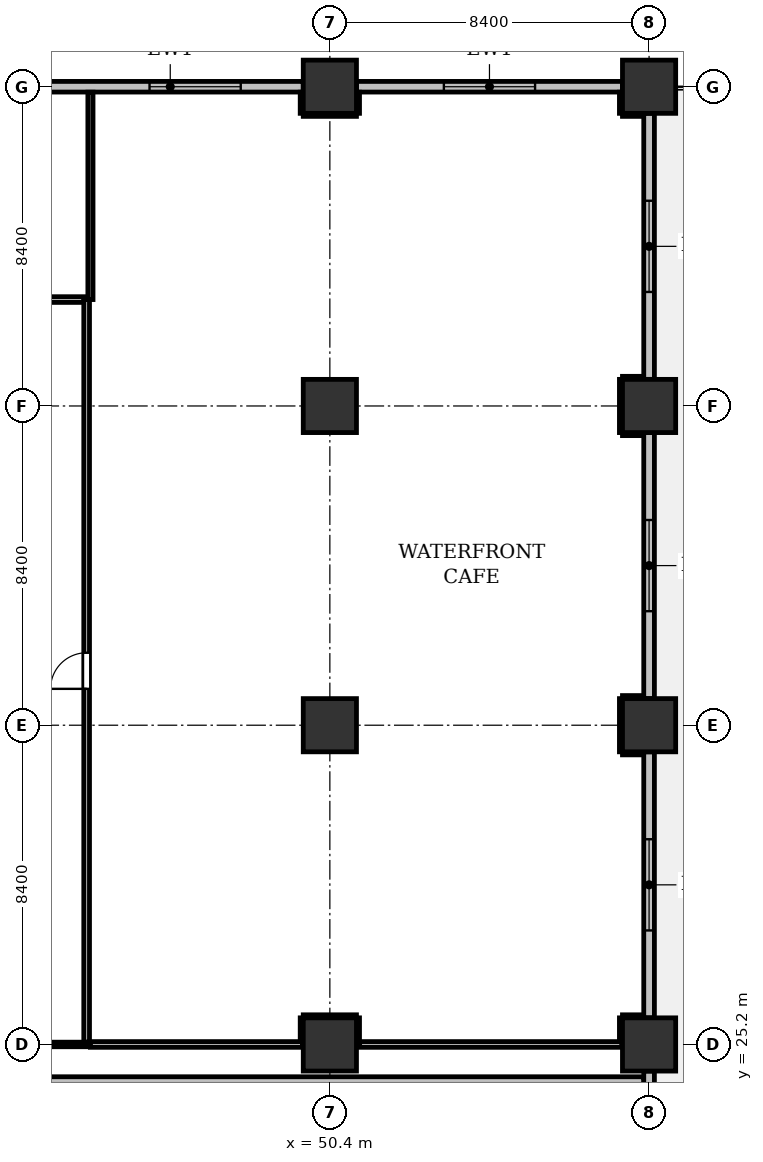
"""IFC4 building model, lengths in metres.
Left out: names, types, materials, properties, quantities, classifications, styles, units other than length and angle.
Written with IfcOpenShell. Run it as: python <this file> out.ifc"""

import sys

from ifc_helpers import new_model, si_unit, direction, frame, frame_2d, origin, origin_2d, place, context, subcontext, project, spatial, rectangle, extrude, element, fill, save


model = new_model("IFC4")
c1 = context("Model", 3, precision=1e-05, world=origin(), true_north=direction((0.0, 1.0)))
c2 = subcontext(c1, "Body", "Model", "MODEL_VIEW")
j1 = project(units=[si_unit("LENGTHUNIT", "METRE"), si_unit("PLANEANGLEUNIT", "RADIAN")], contexts=[c1])
p1 = place(None, origin())
s1 = spatial("IfcSite", under=j1, at=p1, CompositionType="ELEMENT")
p2 = place(p1, origin())
s2 = spatial("IfcBuilding", under=s1, at=p2, CompositionType="ELEMENT")
p3 = place(p2, origin())
s3 = spatial("IfcBuildingStorey", under=s2, at=p3, CompositionType="ELEMENT", Elevation=0.0)
for number, where, z_axis, x_axis in (
    (1, (50.4, 25.2, 0.0), (0.0, 0.0, 1.0), (1.0, 0.0, 0.0)),
    (2, (50.4, 33.6, 0.0), (0.0, 0.0, 1.0), (1.0, 0.0, 0.0)),
    (3, (50.4, 42.0, 0.0), (0.0, 0.0, 1.0), (1.0, 0.0, 0.0)),
    (4, (50.4, 50.4, 0.0), (0.0, 0.0, 1.0), (1.0, 0.0, 0.0)),
    (5, (58.8, 25.2, 0.0), (0.0, 0.0, 1.0), (1.0, 0.0, 0.0)),
    (6, (58.8, 33.6, 0.0), (0.0, 0.0, 1.0), (1.0, 0.0, 0.0)),
    (7, (58.8, 42.0, 0.0), (0.0, 0.0, 1.0), (1.0, 0.0, 0.0)),
    (8, (58.8, 50.4, 0.0), (0.0, 0.0, 1.0), (1.0, 0.0, 0.0)),
):
    element("IfcColumn", number, at=place(p3, frame(where, z_axis=z_axis, x_axis=x_axis)), inside=s3, PredefinedType="COLUMN", context=c2, shape_type="SweptSolid", body=[
        extrude(rectangle(XDim=1.4, YDim=1.4, at=origin_2d()), origin(), (0.0, 0.0, 1.0), 5.4),
    ])
p4 = place(p3, frame((42.7, 50.4, 0.0), z_axis=(0.0, 0.0, 1.0), x_axis=(1.0, 0.0, 0.0)))
e9 = element("IfcWall", 9, at=p4, inside=s3, PredefinedType="STANDARD", context=c2, shape_type="SweptSolid", body=[
    extrude(rectangle(XDim=7.0, YDim=0.28, at=frame_2d((3.5, 0.0))), origin(), (0.0, 0.0, 1.0), 4.325),
])
p5 = place(p4, frame((2.955, 0.0, 0.9)))
e10 = element("IfcOpeningElement", 10, at=p5, cuts=e9, PredefinedType="OPENING", context=c2, shape_type="SweptSolid", body=[
    extrude(rectangle(XDim=2.4, YDim=1.8, at=frame_2d((1.2, 0.9))), frame((0.0, 0.15, 0.0), z_axis=(0.0, -1.0, 0.0), x_axis=(1.0, 0.0, 0.0)), (0.0, 0.0, 1.0), 0.3),
])
p6 = place(p3, frame((51.1, 50.4, 0.0), z_axis=(0.0, 0.0, 1.0), x_axis=(1.0, 0.0, 0.0)))
e11 = element("IfcWall", 11, at=p6, inside=s3, PredefinedType="STANDARD", context=c2, shape_type="SweptSolid", body=[
    extrude(rectangle(XDim=7.0, YDim=0.28, at=frame_2d((3.5, 0.0))), origin(), (0.0, 0.0, 1.0), 4.325),
])
p7 = place(p6, frame((2.3, 0.0, 0.9)))
e12 = element("IfcOpeningElement", 12, at=p7, cuts=e11, PredefinedType="OPENING", context=c2, shape_type="SweptSolid", body=[
    extrude(rectangle(XDim=2.4, YDim=1.8, at=frame_2d((1.2, 0.9))), frame((0.0, 0.15, 0.0), z_axis=(0.0, -1.0, 0.0), x_axis=(1.0, 0.0, 0.0)), (0.0, 0.0, 1.0), 0.3),
])
p8 = place(p3, frame((58.8, 49.7, 0.0), z_axis=(0.0, 0.0, 1.0), x_axis=(0.0, -1.0, 0.0)))
e13 = element("IfcWall", 13, at=p8, inside=s3, PredefinedType="STANDARD", context=c2, shape_type="SweptSolid", body=[
    extrude(rectangle(XDim=7.0, YDim=0.28, at=frame_2d((3.5, 0.0))), origin(), (0.0, 0.0, 1.0), 4.513),
])
p9 = place(p8, frame((2.3, 0.0, 0.9)))
e14 = element("IfcOpeningElement", 14, at=p9, cuts=e13, PredefinedType="OPENING", context=c2, shape_type="SweptSolid", body=[
    extrude(rectangle(XDim=2.4, YDim=1.8, at=frame_2d((1.2, 0.9))), frame((0.0, 0.15, 0.0), z_axis=(0.0, -1.0, 0.0), x_axis=(1.0, 0.0, 0.0)), (0.0, 0.0, 1.0), 0.3),
])
p10 = place(p3, frame((58.8, 41.3, 0.0), z_axis=(0.0, 0.0, 1.0), x_axis=(0.0, -1.0, 0.0)))
e15 = element("IfcWall", 15, at=p10, inside=s3, PredefinedType="STANDARD", context=c2, shape_type="SweptSolid", body=[
    extrude(rectangle(XDim=7.0, YDim=0.28, at=frame_2d((3.5, 0.0))), origin(), (0.0, 0.0, 1.0), 4.513),
])
p11 = place(p10, frame((2.3, 0.0, 0.9)))
e16 = element("IfcOpeningElement", 16, at=p11, cuts=e15, PredefinedType="OPENING", context=c2, shape_type="SweptSolid", body=[
    extrude(rectangle(XDim=2.4, YDim=1.8, at=frame_2d((1.2, 0.9))), frame((0.0, 0.15, 0.0), z_axis=(0.0, -1.0, 0.0), x_axis=(1.0, 0.0, 0.0)), (0.0, 0.0, 1.0), 0.3),
])
p12 = place(p3, frame((58.8, 32.9, 0.0), z_axis=(0.0, 0.0, 1.0), x_axis=(0.0, -1.0, 0.0)))
e17 = element("IfcWall", 17, at=p12, inside=s3, PredefinedType="STANDARD", context=c2, shape_type="SweptSolid", body=[
    extrude(rectangle(XDim=7.0, YDim=0.28, at=frame_2d((3.5, 0.0))), origin(), (0.0, 0.0, 1.0), 4.513),
])
p13 = place(p12, frame((2.3, 0.0, 0.9)))
e18 = element("IfcOpeningElement", 18, at=p13, cuts=e17, PredefinedType="OPENING", context=c2, shape_type="SweptSolid", body=[
    extrude(rectangle(XDim=2.4, YDim=1.8, at=frame_2d((1.2, 0.9))), frame((0.0, 0.15, 0.0), z_axis=(0.0, -1.0, 0.0), x_axis=(1.0, 0.0, 0.0)), (0.0, 0.0, 1.0), 0.3),
])
p14 = place(p3, frame((58.8, 24.5, 0.0), z_axis=(0.0, 0.0, 1.0), x_axis=(0.0, -1.0, 0.0)))
e19 = element("IfcWall", 19, at=p14, inside=s3, PredefinedType="STANDARD", context=c2, shape_type="SweptSolid", body=[
    extrude(rectangle(XDim=7.0, YDim=0.28, at=frame_2d((3.5, 0.0))), origin(), (0.0, 0.0, 1.0), 4.513),
])
p15 = place(p14, frame((0.38, 0.0, 0.0)))
e20 = element("IfcOpeningElement", 20, at=p15, cuts=e19, PredefinedType="OPENING", context=c2, shape_type="SweptSolid", body=[
    extrude(rectangle(XDim=2.0, YDim=2.4, at=frame_2d((1.0, 1.2))), frame((0.0, 0.15, 0.0), z_axis=(0.0, -1.0, 0.0), x_axis=(1.0, 0.0, 0.0)), (0.0, 0.0, 1.0), 0.3),
])
p16 = place(p3, frame((58.656, 24.25, 0.0), z_axis=(0.0, 0.0, 1.0), x_axis=(-1.0, 0.0, 0.0)))
e21 = element("IfcWall", 21, at=p16, inside=s3, PredefinedType="PARTITIONING", context=c2, shape_type="SweptSolid", body=[
    extrude(rectangle(XDim=24.906, YDim=0.2, at=frame_2d((12.453, 0.0))), origin(), (0.0, 0.0, 1.0), 4.513),
])
p17 = place(p3, frame((42.784, 25.2, 0.0), z_axis=(0.0, 0.0, 1.0), x_axis=(1.0, 0.0, 0.0)))
e22 = element("IfcWall", 22, at=p17, inside=s3, PredefinedType="PARTITIONING", context=c2, shape_type="SweptSolid", body=[
    extrude(rectangle(XDim=1.216, YDim=0.12, at=frame_2d((0.608, 0.0))), origin(), (0.0, 0.0, 1.0), 4.325),
])
p18 = place(p3, frame((44.0, 25.264, 0.0), z_axis=(0.0, 0.0, 1.0), x_axis=(0.0, 1.0, 0.0)))
e23 = element("IfcWall", 23, at=p18, inside=s3, PredefinedType="PARTITIONING", context=c2, shape_type="SweptSolid", body=[
    extrude(rectangle(XDim=19.536, YDim=0.15, at=frame_2d((9.768, 0.0))), origin(), (0.0, 0.0, 1.0), 4.325),
])
p19 = place(p18, frame((9.293, 0.0, 0.0)))
e24 = element("IfcOpeningElement", 24, at=p19, cuts=e23, PredefinedType="OPENING", context=c2, shape_type="SweptSolid", body=[
    extrude(rectangle(XDim=0.95, YDim=2.15, at=frame_2d((0.475, 1.075))), frame((0.0, 0.085, 0.0), z_axis=(0.0, -1.0, 0.0), x_axis=(1.0, 0.0, 0.0)), (0.0, 0.0, 1.0), 0.17),
])
p20 = place(p3, frame((43.921, 44.8, 0.0), z_axis=(0.0, 0.0, 1.0), x_axis=(-1.0, 0.0, 0.0)))
e25 = element("IfcWall", 25, at=p20, inside=s3, PredefinedType="PARTITIONING", context=c2, shape_type="SweptSolid", body=[
    extrude(rectangle(XDim=19.261, YDim=0.15, at=frame_2d((9.63, 0.0))), origin(), (0.0, 0.0, 1.0), 4.513),
])
p21 = place(p3, frame((44.1, 25.2, 0.0), z_axis=(0.0, 0.0, 1.0), x_axis=(1.0, 0.0, 0.0)))
e26 = element("IfcWall", 26, at=p21, inside=s3, PredefinedType="PARTITIONING", context=c2, shape_type="SweptSolid", body=[
    extrude(rectangle(XDim=5.58, YDim=0.15, at=frame_2d((2.79, 0.0))), origin(), (0.0, 0.0, 1.0), 4.325),
])
p22 = place(p3, frame((49.68, 25.279, 0.0), z_axis=(0.0, 0.0, 1.0), x_axis=(0.0, 1.0, 0.0)))
e27 = element("IfcWall", 27, at=p22, inside=s3, PredefinedType="PARTITIONING", context=c2, shape_type="SweptSolid", body=[
    extrude(rectangle(XDim=0.621, YDim=0.12, at=frame_2d((0.311, 0.0))), origin(), (0.0, 0.0, 1.0), 4.325),
])
p23 = place(p3, frame((49.7, 25.92, 0.0), z_axis=(0.0, 0.0, 1.0), x_axis=(1.0, 0.0, 0.0)))
e28 = element("IfcWall", 28, at=p23, inside=s3, PredefinedType="PARTITIONING", context=c2, shape_type="SweptSolid", body=[
    extrude(rectangle(XDim=1.4, YDim=0.12, at=frame_2d((0.7, 0.0))), origin(), (0.0, 0.0, 1.0), 4.513),
])
p24 = place(p3, frame((51.12, 25.9, 0.0), z_axis=(0.0, 0.0, 1.0), x_axis=(0.0, -1.0, 0.0)))
e29 = element("IfcWall", 29, at=p24, inside=s3, PredefinedType="PARTITIONING", context=c2, shape_type="SweptSolid", body=[
    extrude(rectangle(XDim=0.7, YDim=0.12, at=frame_2d((0.35, 0.0))), origin(), (0.0, 0.0, 1.0), 4.325),
])
p25 = place(p3, frame((51.184, 25.2, 0.0), z_axis=(0.0, 0.0, 1.0), x_axis=(1.0, 0.0, 0.0)))
e30 = element("IfcWall", 30, at=p25, inside=s3, PredefinedType="PARTITIONING", context=c2, shape_type="SweptSolid", body=[
    extrude(rectangle(XDim=6.896, YDim=0.15, at=frame_2d((3.448, 0.0))), origin(), (0.0, 0.0, 1.0), 4.325),
])
p26 = place(p3, frame((58.08, 25.279, 0.0), z_axis=(0.0, 0.0, 1.0), x_axis=(0.0, 1.0, 0.0)))
e31 = element("IfcWall", 31, at=p26, inside=s3, PredefinedType="PARTITIONING", context=c2, shape_type="SweptSolid", body=[
    extrude(rectangle(XDim=0.621, YDim=0.12, at=frame_2d((0.311, 0.0))), origin(), (0.0, 0.0, 1.0), 4.325),
])
for number, where, z_axis, x_axis in (
    (32, (58.1, 25.92, 0.0), (0.0, 0.0, 1.0), (1.0, 0.0, 0.0)),
    (33, (58.656, 32.88, 0.0), (0.0, 0.0, 1.0), (-1.0, 0.0, 0.0)),
):
    element("IfcWall", number, at=place(p3, frame(where, z_axis=z_axis, x_axis=x_axis)), inside=s3, PredefinedType="PARTITIONING", context=c2, shape_type="SweptSolid", body=[
        extrude(rectangle(XDim=0.556, YDim=0.12, at=frame_2d((0.278, 0.0))), origin(), (0.0, 0.0, 1.0), 5.125),
    ])
p27 = place(p3, frame((58.08, 32.9, 0.0), z_axis=(0.0, 0.0, 1.0), x_axis=(0.0, 1.0, 0.0)))
e34 = element("IfcWall", 34, at=p27, inside=s3, PredefinedType="PARTITIONING", context=c2, shape_type="SweptSolid", body=[
    extrude(rectangle(XDim=1.4, YDim=0.12, at=frame_2d((0.7, 0.0))), origin(), (0.0, 0.0, 1.0), 4.325),
])
for number, where, z_axis, x_axis in (
    (35, (58.1, 34.32, 0.0), (0.0, 0.0, 1.0), (1.0, 0.0, 0.0)),
    (36, (58.656, 41.28, 0.0), (0.0, 0.0, 1.0), (-1.0, 0.0, 0.0)),
):
    element("IfcWall", number, at=place(p3, frame(where, z_axis=z_axis, x_axis=x_axis)), inside=s3, PredefinedType="PARTITIONING", context=c2, shape_type="SweptSolid", body=[
        extrude(rectangle(XDim=0.556, YDim=0.12, at=frame_2d((0.278, 0.0))), origin(), (0.0, 0.0, 1.0), 5.125),
    ])
p28 = place(p3, frame((58.08, 41.3, 0.0), z_axis=(0.0, 0.0, 1.0), x_axis=(0.0, 1.0, 0.0)))
e37 = element("IfcWall", 37, at=p28, inside=s3, PredefinedType="PARTITIONING", context=c2, shape_type="SweptSolid", body=[
    extrude(rectangle(XDim=1.4, YDim=0.12, at=frame_2d((0.7, 0.0))), origin(), (0.0, 0.0, 1.0), 4.325),
])
for number, where, z_axis, x_axis in (
    (38, (58.1, 42.72, 0.0), (0.0, 0.0, 1.0), (1.0, 0.0, 0.0)),
    (39, (58.656, 49.68, 0.0), (0.0, 0.0, 1.0), (-1.0, 0.0, 0.0)),
):
    element("IfcWall", number, at=place(p3, frame(where, z_axis=z_axis, x_axis=x_axis)), inside=s3, PredefinedType="PARTITIONING", context=c2, shape_type="SweptSolid", body=[
        extrude(rectangle(XDim=0.556, YDim=0.12, at=frame_2d((0.278, 0.0))), origin(), (0.0, 0.0, 1.0), 5.125),
    ])
for number, where, z_axis, x_axis in (
    (40, (58.08, 49.7, 0.0), (0.0, 0.0, 1.0), (0.0, 1.0, 0.0)),
    (41, (51.12, 50.256, 0.0), (0.0, 0.0, 1.0), (0.0, -1.0, 0.0)),
):
    element("IfcWall", number, at=place(p3, frame(where, z_axis=z_axis, x_axis=x_axis)), inside=s3, PredefinedType="PARTITIONING", context=c2, shape_type="SweptSolid", body=[
        extrude(rectangle(XDim=0.556, YDim=0.12, at=frame_2d((0.278, 0.0))), origin(), (0.0, 0.0, 1.0), 5.125),
    ])
p29 = place(p3, frame((51.1, 49.68, 0.0), z_axis=(0.0, 0.0, 1.0), x_axis=(-1.0, 0.0, 0.0)))
e42 = element("IfcWall", 42, at=p29, inside=s3, PredefinedType="PARTITIONING", context=c2, shape_type="SweptSolid", body=[
    extrude(rectangle(XDim=1.4, YDim=0.12, at=frame_2d((0.7, 0.0))), origin(), (0.0, 0.0, 1.0), 4.513),
])
p30 = place(p3, frame((49.68, 49.7, 0.0), z_axis=(0.0, 0.0, 1.0), x_axis=(0.0, 1.0, 0.0)))
e43 = element("IfcWall", 43, at=p30, inside=s3, PredefinedType="PARTITIONING", context=c2, shape_type="SweptSolid", body=[
    extrude(rectangle(XDim=0.556, YDim=0.12, at=frame_2d((0.278, 0.0))), origin(), (0.0, 0.0, 1.0), 5.125),
])
p31 = place(p3, frame((44.1, 50.256, 0.0), z_axis=(0.0, 0.0, 1.0), x_axis=(0.0, -1.0, 0.0)))
e44 = element("IfcWall", 44, at=p31, inside=s3, PredefinedType="PARTITIONING", context=c2, shape_type="SweptSolid", body=[
    extrude(rectangle(XDim=5.456, YDim=0.135, at=frame_2d((2.728, 0.0))), origin(), (0.0, 0.0, 1.0), 5.125),
])
p32 = place(p5, origin())
e45 = element("IfcWindow", 45, at=p32, inside=s3, PartitioningType="SINGLE_PANEL", PredefinedType="WINDOW", context=c2, shape_type="SweptSolid", body=[
    extrude(rectangle(XDim=2.4, YDim=1.8, at=frame_2d((1.2, 0.9))), frame((0.0, 0.03, 0.0), z_axis=(0.0, -1.0, 0.0), x_axis=(1.0, 0.0, 0.0)), (0.0, 0.0, 1.0), 0.06),
])
fill(e10, e45)
p33 = place(p7, origin())
e46 = element("IfcWindow", 46, at=p33, inside=s3, PartitioningType="SINGLE_PANEL", PredefinedType="WINDOW", context=c2, shape_type="SweptSolid", body=[
    extrude(rectangle(XDim=2.4, YDim=1.8, at=frame_2d((1.2, 0.9))), frame((0.0, 0.03, 0.0), z_axis=(0.0, -1.0, 0.0), x_axis=(1.0, 0.0, 0.0)), (0.0, 0.0, 1.0), 0.06),
])
fill(e12, e46)
p34 = place(p9, origin())
e47 = element("IfcWindow", 47, at=p34, inside=s3, PartitioningType="SINGLE_PANEL", PredefinedType="WINDOW", context=c2, shape_type="SweptSolid", body=[
    extrude(rectangle(XDim=2.4, YDim=1.8, at=frame_2d((1.2, 0.9))), frame((0.0, 0.03, 0.0), z_axis=(0.0, -1.0, 0.0), x_axis=(1.0, 0.0, 0.0)), (0.0, 0.0, 1.0), 0.06),
])
fill(e14, e47)
p35 = place(p11, origin())
e48 = element("IfcWindow", 48, at=p35, inside=s3, PartitioningType="SINGLE_PANEL", PredefinedType="WINDOW", context=c2, shape_type="SweptSolid", body=[
    extrude(rectangle(XDim=2.4, YDim=1.8, at=frame_2d((1.2, 0.9))), frame((0.0, 0.03, 0.0), z_axis=(0.0, -1.0, 0.0), x_axis=(1.0, 0.0, 0.0)), (0.0, 0.0, 1.0), 0.06),
])
fill(e16, e48)
p36 = place(p13, origin())
e49 = element("IfcWindow", 49, at=p36, inside=s3, PartitioningType="SINGLE_PANEL", PredefinedType="WINDOW", context=c2, shape_type="SweptSolid", body=[
    extrude(rectangle(XDim=2.4, YDim=1.8, at=frame_2d((1.2, 0.9))), frame((0.0, 0.03, 0.0), z_axis=(0.0, -1.0, 0.0), x_axis=(1.0, 0.0, 0.0)), (0.0, 0.0, 1.0), 0.06),
])
fill(e18, e49)
p37 = place(p19, origin())
e50 = element("IfcDoor", 50, at=p37, inside=s3, OperationType="SINGLE_SWING_LEFT", PredefinedType="DOOR", context=c2, shape_type="SweptSolid", body=[
    extrude(rectangle(XDim=0.95, YDim=2.15, at=frame_2d((0.475, 1.075))), frame((0.0, 0.025, 0.0), z_axis=(0.0, -1.0, 0.0), x_axis=(1.0, 0.0, 0.0)), (0.0, 0.0, 1.0), 0.05),
])
fill(e24, e50)
save(model, sys.argv[1])
